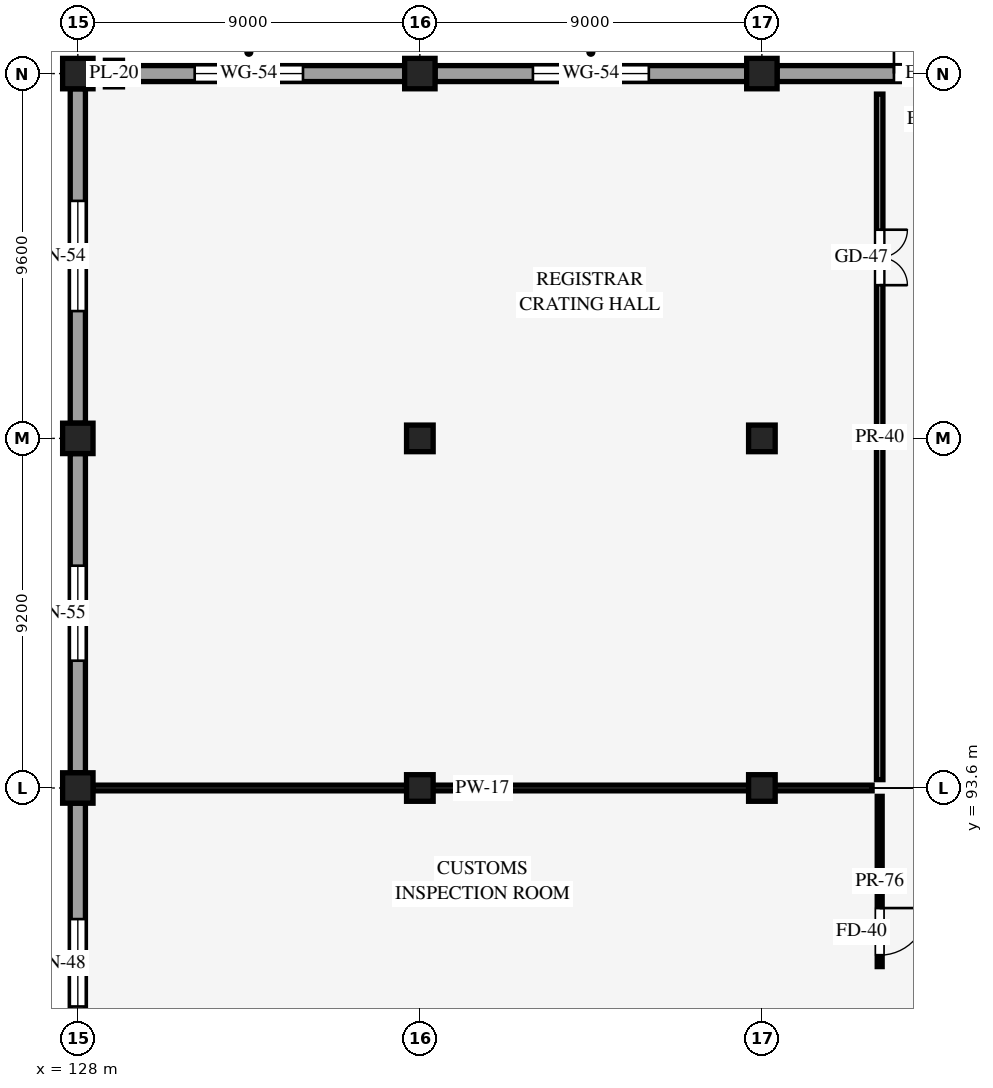
"""IFC4 building model, lengths in metres.
Left out: names, types, materials, properties, quantities, classifications, styles, units other than length and angle.
Written with IfcOpenShell. Run it as: python <this file> out.ifc"""

import sys

from ifc_helpers import new_model, si_unit, direction, frame, frame_2d, origin, origin_2d, place, context, subcontext, project, spatial, rectangle, extrude, element, fill, save


model = new_model("IFC4")
c1 = context("Model", 3, precision=1e-05, world=origin(), true_north=direction((0.0, 1.0)))
c2 = subcontext(c1, "Body", "Model", "MODEL_VIEW")
j1 = project(units=[si_unit("LENGTHUNIT", "METRE"), si_unit("PLANEANGLEUNIT", "RADIAN")], contexts=[c1])
p1 = place(None, origin())
s1 = spatial("IfcSite", under=j1, at=p1, CompositionType="ELEMENT")
p2 = place(p1, origin())
s2 = spatial("IfcBuilding", under=s1, at=p2, CompositionType="ELEMENT")
p3 = place(p2, origin())
s3 = spatial("IfcBuildingStorey", under=s2, at=p3, CompositionType="ELEMENT", Elevation=0.0)
for number, where, z_axis, x_axis in (
    (1, (128.0, 93.6, 0.0), (0.0, 0.0, 1.0), (1.0, 0.0, 0.0)),
    (2, (128.0, 102.8, 0.0), (0.0, 0.0, 1.0), (1.0, 0.0, 0.0)),
    (3, (128.0, 112.4, 0.0), (0.0, 0.0, 1.0), (1.0, 0.0, 0.0)),
):
    element("IfcColumn", number, at=place(p3, frame(where, z_axis=z_axis, x_axis=x_axis)), inside=s3, PredefinedType="COLUMN", context=c2, shape_type="SweptSolid", body=[
        extrude(rectangle(XDim=0.8, YDim=0.8, at=origin_2d()), origin(), (0.0, 0.0, 1.0), 5.4),
    ])
for number, where, z_axis, x_axis in (
    (4, (137.0, 93.6, 0.0), (0.0, 0.0, 1.0), (1.0, 0.0, 0.0)),
    (5, (137.0, 102.8, 0.0), (0.0, 0.0, 1.0), (1.0, 0.0, 0.0)),
):
    element("IfcColumn", number, at=place(p3, frame(where, z_axis=z_axis, x_axis=x_axis)), inside=s3, PredefinedType="COLUMN", context=c2, shape_type="SweptSolid", body=[
        extrude(rectangle(XDim=0.7, YDim=0.7, at=origin_2d()), origin(), (0.0, 0.0, 1.0), 5.4),
    ])
p4 = place(p3, frame((137.0, 112.4, 0.0), z_axis=(0.0, 0.0, 1.0), x_axis=(1.0, 0.0, 0.0)))
e6 = element("IfcColumn", 6, at=p4, inside=s3, PredefinedType="COLUMN", context=c2, shape_type="SweptSolid", body=[
    extrude(rectangle(XDim=0.8, YDim=0.8, at=origin_2d()), origin(), (0.0, 0.0, 1.0), 5.4),
])
for number, where, z_axis, x_axis in (
    (7, (146.0, 93.6, 0.0), (0.0, 0.0, 1.0), (1.0, 0.0, 0.0)),
    (8, (146.0, 102.8, 0.0), (0.0, 0.0, 1.0), (1.0, 0.0, 0.0)),
):
    element("IfcColumn", number, at=place(p3, frame(where, z_axis=z_axis, x_axis=x_axis)), inside=s3, PredefinedType="COLUMN", context=c2, shape_type="SweptSolid", body=[
        extrude(rectangle(XDim=0.7, YDim=0.7, at=origin_2d()), origin(), (0.0, 0.0, 1.0), 5.4),
    ])
p5 = place(p3, frame((146.0, 112.4, 0.0), z_axis=(0.0, 0.0, 1.0), x_axis=(1.0, 0.0, 0.0)))
e9 = element("IfcColumn", 9, at=p5, inside=s3, PredefinedType="COLUMN", context=c2, shape_type="SweptSolid", body=[
    extrude(rectangle(XDim=0.8, YDim=0.8, at=origin_2d()), origin(), (0.0, 0.0, 1.0), 5.4),
])
p6 = place(p3, frame((128.95, 112.4, 0.0), z_axis=(0.0, 0.0, 1.0), x_axis=(1.0, 0.0, 0.0)))
e10 = element("IfcColumn", 10, at=p6, inside=s3, PredefinedType="PILASTER", context=c2, shape_type="SweptSolid", body=[
    extrude(rectangle(XDim=0.45, YDim=0.7, at=origin_2d()), origin(), (0.0, 0.0, 1.0), 4.35),
])
p7 = place(p3, frame((128.4, 112.4, 0.0), z_axis=(0.0, 0.0, 1.0), x_axis=(1.0, 0.0, 0.0)))
e11 = element("IfcWall", 11, at=p7, inside=s3, PredefinedType="STANDARD", context=c2, shape_type="SweptSolid", body=[
    extrude(rectangle(XDim=8.2, YDim=0.42, at=frame_2d((4.1, 0.0))), origin(), (0.0, 0.0, 1.0), 4.095),
])
p8 = place(p7, frame((2.675, 0.0, 0.85)))
e12 = element("IfcOpeningElement", 12, at=p8, cuts=e11, PredefinedType="OPENING", context=c2, shape_type="SweptSolid", body=[
    extrude(rectangle(XDim=2.85, YDim=2.5, at=frame_2d((1.425, 1.25))), frame((0.0, 0.22, 0.0), z_axis=(0.0, -1.0, 0.0), x_axis=(1.0, 0.0, 0.0)), (0.0, 0.0, 1.0), 0.44),
])
p9 = place(p3, frame((137.4, 112.4, 0.0), z_axis=(0.0, 0.0, 1.0), x_axis=(1.0, 0.0, 0.0)))
e13 = element("IfcWall", 13, at=p9, inside=s3, PredefinedType="STANDARD", context=c2, shape_type="SweptSolid", body=[
    extrude(rectangle(XDim=8.2, YDim=0.42, at=frame_2d((4.1, 0.0))), origin(), (0.0, 0.0, 1.0), 4.095),
])
p10 = place(p9, frame((2.575, 0.0, 0.85)))
e14 = element("IfcOpeningElement", 14, at=p10, cuts=e13, PredefinedType="OPENING", context=c2, shape_type="SweptSolid", body=[
    extrude(rectangle(XDim=3.05, YDim=2.55, at=frame_2d((1.525, 1.275))), frame((0.0, 0.22, 0.0), z_axis=(0.0, -1.0, 0.0), x_axis=(1.0, 0.0, 0.0)), (0.0, 0.0, 1.0), 0.44),
])
p11 = place(p3, frame((146.4, 112.4, 0.0), z_axis=(0.0, 0.0, 1.0), x_axis=(1.0, 0.0, 0.0)))
e15 = element("IfcWall", 15, at=p11, inside=s3, PredefinedType="STANDARD", context=c2, shape_type="SweptSolid", body=[
    extrude(rectangle(XDim=8.2, YDim=0.42, at=frame_2d((4.1, 0.0))), origin(), (0.0, 0.0, 1.0), 4.095),
])
p12 = place(p11, frame((3.075, 0.0, 0.0)))
e16 = element("IfcOpeningElement", 16, at=p12, cuts=e15, PredefinedType="OPENING", context=c2, shape_type="SweptSolid", body=[
    extrude(rectangle(XDim=2.05, YDim=2.45, at=frame_2d((1.025, 1.225))), frame((0.0, 0.22, 0.0), z_axis=(0.0, -1.0, 0.0), x_axis=(1.0, 0.0, 0.0)), (0.0, 0.0, 1.0), 0.44),
])
p13 = place(p3, frame((128.0, 84.8, 0.0), z_axis=(0.0, 0.0, 1.0), x_axis=(0.0, 1.0, 0.0)))
e17 = element("IfcWall", 17, at=p13, inside=s3, PredefinedType="STANDARD", context=c2, shape_type="SweptSolid", body=[
    extrude(rectangle(XDim=8.4, YDim=0.4, at=frame_2d((4.2, 0.0))), origin(), (0.0, 0.0, 1.0), 4.095),
])
p14 = place(p13, frame((3.05, 0.0, 0.85)))
e18 = element("IfcOpeningElement", 18, at=p14, cuts=e17, PredefinedType="OPENING", context=c2, shape_type="SweptSolid", body=[
    extrude(rectangle(XDim=2.3, YDim=2.5, at=frame_2d((1.15, 1.25))), frame((0.0, 0.21, 0.0), z_axis=(0.0, -1.0, 0.0), x_axis=(1.0, 0.0, 0.0)), (0.0, 0.0, 1.0), 0.42),
])
p15 = place(p3, frame((128.0, 94.0, 0.0), z_axis=(0.0, 0.0, 1.0), x_axis=(0.0, 1.0, 0.0)))
e19 = element("IfcWall", 19, at=p15, inside=s3, PredefinedType="STANDARD", context=c2, shape_type="SweptSolid", body=[
    extrude(rectangle(XDim=8.4, YDim=0.4, at=frame_2d((4.2, 0.0))), origin(), (0.0, 0.0, 1.0), 4.095),
])
p16 = place(p15, frame((2.95, 0.0, 0.85)))
e20 = element("IfcOpeningElement", 20, at=p16, cuts=e19, PredefinedType="OPENING", context=c2, shape_type="SweptSolid", body=[
    extrude(rectangle(XDim=2.5, YDim=2.15, at=frame_2d((1.25, 1.075))), frame((0.0, 0.21, 0.0), z_axis=(0.0, -1.0, 0.0), x_axis=(1.0, 0.0, 0.0)), (0.0, 0.0, 1.0), 0.42),
])
p17 = place(p3, frame((128.0, 103.2, 0.0), z_axis=(0.0, 0.0, 1.0), x_axis=(0.0, 1.0, 0.0)))
e21 = element("IfcWall", 21, at=p17, inside=s3, PredefinedType="STANDARD", context=c2, shape_type="SweptSolid", body=[
    extrude(rectangle(XDim=8.8, YDim=0.4, at=frame_2d((4.4, 0.0))), origin(), (0.0, 0.0, 1.0), 4.095),
])
p18 = place(p17, frame((2.95, 0.0, 0.85)))
e22 = element("IfcOpeningElement", 22, at=p18, cuts=e21, PredefinedType="OPENING", context=c2, shape_type="SweptSolid", body=[
    extrude(rectangle(XDim=2.9, YDim=2.25, at=frame_2d((1.45, 1.125))), frame((0.0, 0.21, 0.0), z_axis=(0.0, -1.0, 0.0), x_axis=(1.0, 0.0, 0.0)), (0.0, 0.0, 1.0), 0.42),
])
p19 = place(p3, frame((149.1, 88.9, 0.0), z_axis=(0.0, 0.0, 1.0), x_axis=(0.0, 1.0, 0.0)))
e23 = element("IfcWall", 23, at=p19, inside=s3, PredefinedType="PARTITIONING", context=c2, shape_type="SweptSolid", body=[
    extrude(rectangle(XDim=4.48, YDim=0.13, at=frame_2d((2.24, 0.0))), origin(), (0.0, 0.0, 1.0), 4.095),
])
p20 = place(p19, frame((1.54, 0.0, 0.0), z_axis=(0.0, 0.0, 1.0), x_axis=(-1.0, 0.0, 0.0)))
e24 = element("IfcOpeningElement", 24, at=p20, cuts=e23, PredefinedType="OPENING", context=c2, shape_type="SweptSolid", body=[
    extrude(rectangle(XDim=1.24, YDim=2.32, at=frame_2d((0.62, 1.16))), frame((0.0, 0.075, 0.0), z_axis=(0.0, -1.0, 0.0), x_axis=(1.0, 0.0, 0.0)), (0.0, 0.0, 1.0), 0.15),
])
p21 = place(p3, frame((128.4, 93.6, 0.0), z_axis=(0.0, 0.0, 1.0), x_axis=(1.0, 0.0, 0.0)))
e25 = element("IfcWall", 25, at=p21, inside=s3, PredefinedType="PARTITIONING", context=c2, shape_type="SweptSolid", body=[
    extrude(rectangle(XDim=20.5, YDim=0.15, at=frame_2d((10.25, 0.0))), origin(), (0.0, 0.0, 1.0), 4.095),
])
p22 = place(p3, frame((149.1, 93.82, 0.0), z_axis=(0.0, 0.0, 1.0), x_axis=(0.0, 1.0, 0.0)))
e26 = element("IfcWall", 26, at=p22, inside=s3, PredefinedType="PARTITIONING", context=c2, shape_type="SweptSolid", body=[
    extrude(rectangle(XDim=18.04, YDim=0.17, at=frame_2d((9.02, 0.0))), origin(), (0.0, 0.0, 1.0), 4.095),
])
p23 = place(p22, frame((14.472, 0.0, 0.0), z_axis=(0.0, 0.0, 1.0), x_axis=(-1.0, 0.0, 0.0)))
e27 = element("IfcOpeningElement", 27, at=p23, cuts=e26, PredefinedType="OPENING", context=c2, shape_type="SweptSolid", body=[
    extrude(rectangle(XDim=1.46, YDim=2.32, at=frame_2d((0.73, 1.16))), frame((0.0, 0.095, 0.0), z_axis=(0.0, -1.0, 0.0), x_axis=(1.0, 0.0, 0.0)), (0.0, 0.0, 1.0), 0.19),
])
p24 = place(p8, origin())
e28 = element("IfcWindow", 28, at=p24, inside=s3, PartitioningType="SINGLE_PANEL", PredefinedType="WINDOW", context=c2, shape_type="SweptSolid", body=[
    extrude(rectangle(XDim=2.85, YDim=2.5, at=frame_2d((1.425, 1.25))), frame((0.0, 0.03, 0.0), z_axis=(0.0, -1.0, 0.0), x_axis=(1.0, 0.0, 0.0)), (0.0, 0.0, 1.0), 0.06),
])
fill(e12, e28)
p25 = place(p10, origin())
e29 = element("IfcWindow", 29, at=p25, inside=s3, PartitioningType="SINGLE_PANEL", PredefinedType="WINDOW", context=c2, shape_type="SweptSolid", body=[
    extrude(rectangle(XDim=3.05, YDim=2.55, at=frame_2d((1.525, 1.275))), frame((0.0, 0.03, 0.0), z_axis=(0.0, -1.0, 0.0), x_axis=(1.0, 0.0, 0.0)), (0.0, 0.0, 1.0), 0.06),
])
fill(e14, e29)
p26 = place(p12, origin())
e30 = element("IfcDoor", 30, at=p26, inside=s3, OperationType="DOUBLE_DOOR_SINGLE_SWING", PredefinedType="DOOR", context=c2, shape_type="SweptSolid", body=[
    extrude(rectangle(XDim=2.05, YDim=2.45, at=frame_2d((1.025, 1.225))), frame((0.0, 0.025, 0.0), z_axis=(0.0, -1.0, 0.0), x_axis=(1.0, 0.0, 0.0)), (0.0, 0.0, 1.0), 0.05),
])
fill(e16, e30)
p27 = place(p14, origin())
e31 = element("IfcWindow", 31, at=p27, inside=s3, PartitioningType="SINGLE_PANEL", PredefinedType="WINDOW", context=c2, shape_type="SweptSolid", body=[
    extrude(rectangle(XDim=2.3, YDim=2.5, at=frame_2d((1.15, 1.25))), frame((0.0, 0.03, 0.0), z_axis=(0.0, -1.0, 0.0), x_axis=(1.0, 0.0, 0.0)), (0.0, 0.0, 1.0), 0.06),
])
fill(e18, e31)
p28 = place(p16, origin())
e32 = element("IfcWindow", 32, at=p28, inside=s3, PartitioningType="SINGLE_PANEL", PredefinedType="WINDOW", context=c2, shape_type="SweptSolid", body=[
    extrude(rectangle(XDim=2.5, YDim=2.15, at=frame_2d((1.25, 1.075))), frame((0.0, 0.03, 0.0), z_axis=(0.0, -1.0, 0.0), x_axis=(1.0, 0.0, 0.0)), (0.0, 0.0, 1.0), 0.06),
])
fill(e20, e32)
p29 = place(p18, origin())
e33 = element("IfcWindow", 33, at=p29, inside=s3, PartitioningType="SINGLE_PANEL", PredefinedType="WINDOW", context=c2, shape_type="SweptSolid", body=[
    extrude(rectangle(XDim=2.9, YDim=2.25, at=frame_2d((1.45, 1.125))), frame((0.0, 0.03, 0.0), z_axis=(0.0, -1.0, 0.0), x_axis=(1.0, 0.0, 0.0)), (0.0, 0.0, 1.0), 0.06),
])
fill(e22, e33)
p30 = place(p20, origin())
e34 = element("IfcDoor", 34, at=p30, inside=s3, OperationType="SINGLE_SWING_LEFT", PredefinedType="DOOR", context=c2, shape_type="SweptSolid", body=[
    extrude(rectangle(XDim=1.24, YDim=2.32, at=frame_2d((0.62, 1.16))), frame((0.0, 0.025, 0.0), z_axis=(0.0, -1.0, 0.0), x_axis=(1.0, 0.0, 0.0)), (0.0, 0.0, 1.0), 0.05),
])
fill(e24, e34)
p31 = place(p23, origin())
e35 = element("IfcDoor", 35, at=p31, inside=s3, OperationType="DOUBLE_DOOR_SINGLE_SWING", PredefinedType="DOOR", context=c2, shape_type="SweptSolid", body=[
    extrude(rectangle(XDim=1.46, YDim=2.32, at=frame_2d((0.73, 1.16))), frame((0.0, 0.025, 0.0), z_axis=(0.0, -1.0, 0.0), x_axis=(1.0, 0.0, 0.0)), (0.0, 0.0, 1.0), 0.05),
])
fill(e27, e35)
save(model, sys.argv[1])
